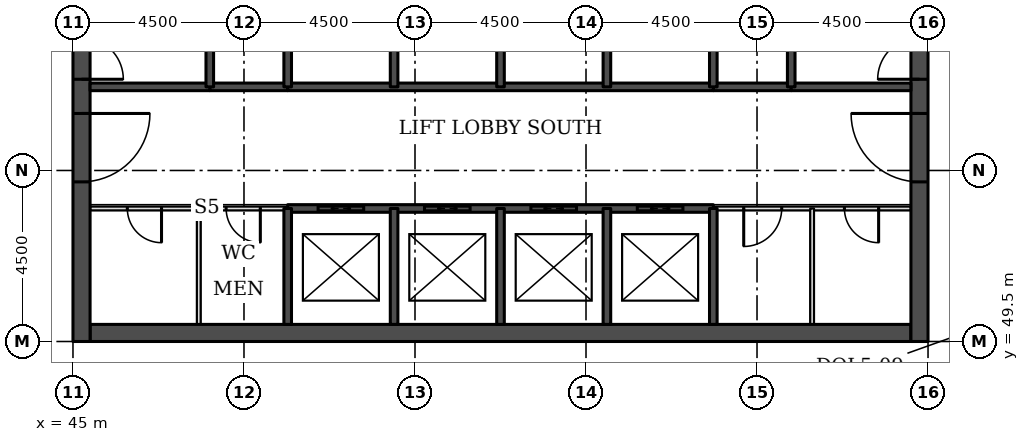
"""IFC4 building model, lengths in metres.
Left out: names, types, materials, properties, quantities, classifications, styles, units other than length and angle.
Written with IfcOpenShell. Run it as: python <this file> out.ifc"""

import sys

from ifc_helpers import new_model, si_unit, direction, frame, frame_2d, origin, place, context, subcontext, project, spatial, rectangle, extrude, element, fill, save


model = new_model("IFC4")
c1 = context("Model", 3, precision=1e-05, world=origin(), true_north=direction((0.0, 1.0)))
c2 = subcontext(c1, "Body", "Model", "MODEL_VIEW")
j1 = project(units=[si_unit("LENGTHUNIT", "METRE"), si_unit("PLANEANGLEUNIT", "RADIAN")], contexts=[c1])
p1 = place(None, origin())
s1 = spatial("IfcSite", under=j1, at=p1, CompositionType="ELEMENT")
p2 = place(p1, origin())
s2 = spatial("IfcBuilding", under=s1, at=p2, CompositionType="ELEMENT")
p3 = place(p2, frame((0.0, 0.0, 108.5)))
s3 = spatial("IfcBuildingStorey", under=s2, at=p3, CompositionType="ELEMENT", Elevation=108.5)
p4 = place(p3, frame((45.45, 49.725, 0.0), z_axis=(0.0, 0.0, 1.0), x_axis=(1.0, 0.0, 0.0)))
e1 = element("IfcWall", 1, at=p4, inside=s3, PredefinedType="SHEAR", context=c2, shape_type="SweptSolid", body=[
    extrude(rectangle(XDim=21.6, YDim=0.45, at=frame_2d((10.8, 0.0))), origin(), (0.0, 0.0, 1.0), 3.7),
])
p5 = place(p3, frame((45.225, 49.5, 0.0), z_axis=(0.0, 0.0, 1.0), x_axis=(0.0, 1.0, 0.0)))
e2 = element("IfcWall", 2, at=p5, inside=s3, PredefinedType="SHEAR", context=c2, shape_type="SweptSolid", body=[
    extrude(rectangle(XDim=22.5, YDim=0.45, at=frame_2d((11.25, 0.0))), origin(), (0.0, 0.0, 1.0), 3.7),
])
p6 = place(p5, frame((4.2, 0.0, 0.0)))
e3 = element("IfcOpeningElement", 3, at=p6, cuts=e2, PredefinedType="OPENING", context=c2, shape_type="SweptSolid", body=[
    extrude(rectangle(XDim=1.8, YDim=2.1, at=frame_2d((0.9, 1.05))), frame((0.0, 0.235, 0.0), z_axis=(0.0, -1.0, 0.0), x_axis=(1.0, 0.0, 0.0)), (0.0, 0.0, 1.0), 0.47),
])
p7 = place(p5, frame((6.9, 0.0, 0.0)))
e4 = element("IfcOpeningElement", 4, at=p7, cuts=e2, PredefinedType="OPENING", context=c2, shape_type="SweptSolid", body=[
    extrude(rectangle(XDim=1.1, YDim=2.1, at=frame_2d((0.55, 1.05))), frame((0.0, 0.235, 0.0), z_axis=(0.0, -1.0, 0.0), x_axis=(1.0, 0.0, 0.0)), (0.0, 0.0, 1.0), 0.47),
])
p8 = place(p5, frame((13.6, 0.0, 0.0)))
e5 = element("IfcOpeningElement", 5, at=p8, cuts=e2, PredefinedType="OPENING", context=c2, shape_type="SweptSolid", body=[
    extrude(rectangle(XDim=1.1, YDim=2.1, at=frame_2d((0.55, 1.05))), frame((0.0, 0.235, 0.0), z_axis=(0.0, -1.0, 0.0), x_axis=(1.0, 0.0, 0.0)), (0.0, 0.0, 1.0), 0.47),
])
p9 = place(p5, frame((16.5, 0.0, 0.0)))
e6 = element("IfcOpeningElement", 6, at=p9, cuts=e2, PredefinedType="OPENING", context=c2, shape_type="SweptSolid", body=[
    extrude(rectangle(XDim=1.8, YDim=2.1, at=frame_2d((0.9, 1.05))), frame((0.0, 0.235, 0.0), z_axis=(0.0, -1.0, 0.0), x_axis=(1.0, 0.0, 0.0)), (0.0, 0.0, 1.0), 0.47),
])
p10 = place(p3, frame((67.275, 49.5, 0.0), z_axis=(0.0, 0.0, 1.0), x_axis=(0.0, 1.0, 0.0)))
e7 = element("IfcWall", 7, at=p10, inside=s3, PredefinedType="SHEAR", context=c2, shape_type="SweptSolid", body=[
    extrude(rectangle(XDim=22.5, YDim=0.45, at=frame_2d((11.25, 0.0))), origin(), (0.0, 0.0, 1.0), 3.7),
])
p11 = place(p10, frame((4.2, 0.0, 0.0)))
e8 = element("IfcOpeningElement", 8, at=p11, cuts=e7, PredefinedType="OPENING", context=c2, shape_type="SweptSolid", body=[
    extrude(rectangle(XDim=1.8, YDim=2.1, at=frame_2d((0.9, 1.05))), frame((0.0, 0.235, 0.0), z_axis=(0.0, -1.0, 0.0), x_axis=(1.0, 0.0, 0.0)), (0.0, 0.0, 1.0), 0.47),
])
p12 = place(p10, frame((6.9, 0.0, 0.0)))
e9 = element("IfcOpeningElement", 9, at=p12, cuts=e7, PredefinedType="OPENING", context=c2, shape_type="SweptSolid", body=[
    extrude(rectangle(XDim=1.1, YDim=2.1, at=frame_2d((0.55, 1.05))), frame((0.0, 0.235, 0.0), z_axis=(0.0, -1.0, 0.0), x_axis=(1.0, 0.0, 0.0)), (0.0, 0.0, 1.0), 0.47),
])
p13 = place(p10, frame((13.6, 0.0, 0.0)))
e10 = element("IfcOpeningElement", 10, at=p13, cuts=e7, PredefinedType="OPENING", context=c2, shape_type="SweptSolid", body=[
    extrude(rectangle(XDim=1.1, YDim=2.1, at=frame_2d((0.55, 1.05))), frame((0.0, 0.235, 0.0), z_axis=(0.0, -1.0, 0.0), x_axis=(1.0, 0.0, 0.0)), (0.0, 0.0, 1.0), 0.47),
])
p14 = place(p10, frame((16.5, 0.0, 0.0)))
e11 = element("IfcOpeningElement", 11, at=p14, cuts=e7, PredefinedType="OPENING", context=c2, shape_type="SweptSolid", body=[
    extrude(rectangle(XDim=1.8, YDim=2.1, at=frame_2d((0.9, 1.05))), frame((0.0, 0.235, 0.0), z_axis=(0.0, -1.0, 0.0), x_axis=(1.0, 0.0, 0.0)), (0.0, 0.0, 1.0), 0.47),
])
p15 = place(p3, frame((45.45, 53.0, 0.0), z_axis=(0.0, 0.0, 1.0), x_axis=(1.0, 0.0, 0.0)))
e12 = element("IfcWall", 12, at=p15, inside=s3, PredefinedType="PARTITIONING", context=c2, shape_type="SweptSolid", body=[
    extrude(rectangle(XDim=5.2, YDim=0.1, at=frame_2d((2.6, 0.0))), origin(), (0.0, 0.0, 1.0), 3.55),
])
p16 = place(p15, frame((0.98, 0.0, 0.0)))
e13 = element("IfcOpeningElement", 13, at=p16, cuts=e12, PredefinedType="OPENING", context=c2, shape_type="SweptSolid", body=[
    extrude(rectangle(XDim=0.9, YDim=2.1, at=frame_2d((0.45, 1.05))), frame((0.0, 0.06, 0.0), z_axis=(0.0, -1.0, 0.0), x_axis=(1.0, 0.0, 0.0)), (0.0, 0.0, 1.0), 0.12),
])
p17 = place(p15, frame((3.58, 0.0, 0.0)))
e14 = element("IfcOpeningElement", 14, at=p17, cuts=e12, PredefinedType="OPENING", context=c2, shape_type="SweptSolid", body=[
    extrude(rectangle(XDim=0.9, YDim=2.1, at=frame_2d((0.45, 1.05))), frame((0.0, 0.06, 0.0), z_axis=(0.0, -1.0, 0.0), x_axis=(1.0, 0.0, 0.0)), (0.0, 0.0, 1.0), 0.12),
])
p18 = place(p3, frame((61.85, 53.0, 0.0), z_axis=(0.0, 0.0, 1.0), x_axis=(1.0, 0.0, 0.0)))
e15 = element("IfcWall", 15, at=p18, inside=s3, PredefinedType="PARTITIONING", context=c2, shape_type="SweptSolid", body=[
    extrude(rectangle(XDim=5.2, YDim=0.1, at=frame_2d((2.6, 0.0))), origin(), (0.0, 0.0, 1.0), 3.55),
])
p19 = place(p18, frame((3.45, 0.0, 0.0)))
e16 = element("IfcOpeningElement", 16, at=p19, cuts=e15, PredefinedType="OPENING", context=c2, shape_type="SweptSolid", body=[
    extrude(rectangle(XDim=0.9, YDim=2.1, at=frame_2d((0.45, 1.05))), frame((0.0, 0.06, 0.0), z_axis=(0.0, -1.0, 0.0), x_axis=(1.0, 0.0, 0.0)), (0.0, 0.0, 1.0), 0.12),
])
p20 = place(p18, frame((0.8, 0.0, 0.0)))
e17 = element("IfcOpeningElement", 17, at=p20, cuts=e15, PredefinedType="OPENING", context=c2, shape_type="SweptSolid", body=[
    extrude(rectangle(XDim=1.0, YDim=2.1, at=frame_2d((0.5, 1.05))), frame((0.0, 0.06, 0.0), z_axis=(0.0, -1.0, 0.0), x_axis=(1.0, 0.0, 0.0)), (0.0, 0.0, 1.0), 0.12),
])
p21 = place(p3, frame((50.65, 53.0, 0.0), z_axis=(0.0, 0.0, 1.0), x_axis=(1.0, 0.0, 0.0)))
e18 = element("IfcWall", 18, at=p21, inside=s3, PredefinedType="SOLIDWALL", context=c2, shape_type="SweptSolid", body=[
    extrude(rectangle(XDim=11.2, YDim=0.2, at=frame_2d((5.6, 0.0))), origin(), (0.0, 0.0, 1.0), 3.55),
])
p22 = place(p21, frame((0.8, 0.0, 0.0)))
e19 = element("IfcOpeningElement", 19, at=p22, cuts=e18, PredefinedType="OPENING", context=c2, shape_type="SweptSolid", body=[
    extrude(rectangle(XDim=1.2, YDim=2.1, at=frame_2d((0.6, 1.05))), frame((0.0, 0.11, 0.0), z_axis=(0.0, -1.0, 0.0), x_axis=(1.0, 0.0, 0.0)), (0.0, 0.0, 1.0), 0.22),
])
p23 = place(p21, frame((3.6, 0.0, 0.0)))
e20 = element("IfcOpeningElement", 20, at=p23, cuts=e18, PredefinedType="OPENING", context=c2, shape_type="SweptSolid", body=[
    extrude(rectangle(XDim=1.2, YDim=2.1, at=frame_2d((0.6, 1.05))), frame((0.0, 0.11, 0.0), z_axis=(0.0, -1.0, 0.0), x_axis=(1.0, 0.0, 0.0)), (0.0, 0.0, 1.0), 0.22),
])
p24 = place(p21, frame((6.4, 0.0, 0.0)))
e21 = element("IfcOpeningElement", 21, at=p24, cuts=e18, PredefinedType="OPENING", context=c2, shape_type="SweptSolid", body=[
    extrude(rectangle(XDim=1.2, YDim=2.1, at=frame_2d((0.6, 1.05))), frame((0.0, 0.11, 0.0), z_axis=(0.0, -1.0, 0.0), x_axis=(1.0, 0.0, 0.0)), (0.0, 0.0, 1.0), 0.22),
])
p25 = place(p21, frame((9.2, 0.0, 0.0)))
e22 = element("IfcOpeningElement", 22, at=p25, cuts=e18, PredefinedType="OPENING", context=c2, shape_type="SweptSolid", body=[
    extrude(rectangle(XDim=1.2, YDim=2.1, at=frame_2d((0.6, 1.05))), frame((0.0, 0.11, 0.0), z_axis=(0.0, -1.0, 0.0), x_axis=(1.0, 0.0, 0.0)), (0.0, 0.0, 1.0), 0.22),
])
for number, where, z_axis, x_axis in (
    (23, (48.6, 56.2, 0.0), (0.0, 0.0, 1.0), (1.0, 0.0, 0.0)),
    (24, (61.85, 56.2, 0.0), (0.0, 0.0, 1.0), (1.0, 0.0, 0.0)),
):
    element("IfcWall", number, at=place(p3, frame(where, z_axis=z_axis, x_axis=x_axis)), inside=s3, PredefinedType="SOLIDWALL", context=c2, shape_type="SweptSolid", body=[
        extrude(rectangle(XDim=2.05, YDim=0.2, at=frame_2d((1.025, 0.0))), origin(), (0.0, 0.0, 1.0), 3.55),
    ])
p26 = place(p3, frame((45.45, 56.2, 0.0), z_axis=(0.0, 0.0, 1.0), x_axis=(1.0, 0.0, 0.0)))
e25 = element("IfcWall", 25, at=p26, inside=s3, PredefinedType="SOLIDWALL", context=c2, shape_type="SweptSolid", body=[
    extrude(rectangle(XDim=3.15, YDim=0.2, at=frame_2d((1.575, 0.0))), origin(), (0.0, 0.0, 1.0), 3.55),
])
p27 = place(p3, frame((50.65, 56.2, 0.0), z_axis=(0.0, 0.0, 1.0), x_axis=(1.0, 0.0, 0.0)))
e26 = element("IfcWall", 26, at=p27, inside=s3, PredefinedType="SOLIDWALL", context=c2, shape_type="SweptSolid", body=[
    extrude(rectangle(XDim=11.2, YDim=0.2, at=frame_2d((5.6, 0.0))), origin(), (0.0, 0.0, 1.0), 3.55),
])
p28 = place(p3, frame((63.9, 56.2, 0.0), z_axis=(0.0, 0.0, 1.0), x_axis=(1.0, 0.0, 0.0)))
e27 = element("IfcWall", 27, at=p28, inside=s3, PredefinedType="SOLIDWALL", context=c2, shape_type="SweptSolid", body=[
    extrude(rectangle(XDim=3.15, YDim=0.2, at=frame_2d((1.575, 0.0))), origin(), (0.0, 0.0, 1.0), 3.55),
])
p29 = place(p3, frame((48.31, 49.95, 0.0), z_axis=(0.0, 0.0, 1.0), x_axis=(0.0, 1.0, 0.0)))
e28 = element("IfcWall", 28, at=p29, inside=s3, PredefinedType="PARTITIONING", context=c2, shape_type="SweptSolid", body=[
    extrude(rectangle(XDim=3.05, YDim=0.1, at=frame_2d((1.525, 0.0))), origin(), (0.0, 0.0, 1.0), 3.55),
])
p30 = place(p3, frame((48.6, 56.2, 0.0), z_axis=(0.0, 0.0, 1.0), x_axis=(0.0, 1.0, 0.0)))
e29 = element("IfcWall", 29, at=p30, inside=s3, PredefinedType="SOLIDWALL", context=c2, shape_type="SweptSolid", body=[
    extrude(rectangle(XDim=5.8, YDim=0.2, at=frame_2d((2.9, 0.0))), origin(), (0.0, 0.0, 1.0), 3.55),
])
p31 = place(p3, frame((50.65, 49.95, 0.0), z_axis=(0.0, 0.0, 1.0), x_axis=(0.0, 1.0, 0.0)))
e30 = element("IfcWall", 30, at=p31, inside=s3, PredefinedType="SOLIDWALL", context=c2, shape_type="SweptSolid", body=[
    extrude(rectangle(XDim=3.05, YDim=0.2, at=frame_2d((1.525, 0.0))), origin(), (0.0, 0.0, 1.0), 3.55),
])
p32 = place(p3, frame((50.65, 56.2, 0.0), z_axis=(0.0, 0.0, 1.0), x_axis=(0.0, 1.0, 0.0)))
e31 = element("IfcWall", 31, at=p32, inside=s3, PredefinedType="SOLIDWALL", context=c2, shape_type="SweptSolid", body=[
    extrude(rectangle(XDim=2.8, YDim=0.2, at=frame_2d((1.4, 0.0))), origin(), (0.0, 0.0, 1.0), 3.55),
])
p33 = place(p3, frame((53.45, 49.95, 0.0), z_axis=(0.0, 0.0, 1.0), x_axis=(0.0, 1.0, 0.0)))
e32 = element("IfcWall", 32, at=p33, inside=s3, PredefinedType="SOLIDWALL", context=c2, shape_type="SweptSolid", body=[
    extrude(rectangle(XDim=3.05, YDim=0.2, at=frame_2d((1.525, 0.0))), origin(), (0.0, 0.0, 1.0), 3.55),
])
p34 = place(p3, frame((53.45, 56.2, 0.0), z_axis=(0.0, 0.0, 1.0), x_axis=(0.0, 1.0, 0.0)))
e33 = element("IfcWall", 33, at=p34, inside=s3, PredefinedType="SOLIDWALL", context=c2, shape_type="SweptSolid", body=[
    extrude(rectangle(XDim=2.8, YDim=0.2, at=frame_2d((1.4, 0.0))), origin(), (0.0, 0.0, 1.0), 3.55),
])
p35 = place(p3, frame((56.25, 49.95, 0.0), z_axis=(0.0, 0.0, 1.0), x_axis=(0.0, 1.0, 0.0)))
e34 = element("IfcWall", 34, at=p35, inside=s3, PredefinedType="SOLIDWALL", context=c2, shape_type="SweptSolid", body=[
    extrude(rectangle(XDim=3.05, YDim=0.2, at=frame_2d((1.525, 0.0))), origin(), (0.0, 0.0, 1.0), 3.55),
])
p36 = place(p3, frame((56.25, 56.2, 0.0), z_axis=(0.0, 0.0, 1.0), x_axis=(0.0, 1.0, 0.0)))
e35 = element("IfcWall", 35, at=p36, inside=s3, PredefinedType="SOLIDWALL", context=c2, shape_type="SweptSolid", body=[
    extrude(rectangle(XDim=2.8, YDim=0.2, at=frame_2d((1.4, 0.0))), origin(), (0.0, 0.0, 1.0), 3.55),
])
p37 = place(p3, frame((59.05, 49.95, 0.0), z_axis=(0.0, 0.0, 1.0), x_axis=(0.0, 1.0, 0.0)))
e36 = element("IfcWall", 36, at=p37, inside=s3, PredefinedType="SOLIDWALL", context=c2, shape_type="SweptSolid", body=[
    extrude(rectangle(XDim=3.05, YDim=0.2, at=frame_2d((1.525, 0.0))), origin(), (0.0, 0.0, 1.0), 3.55),
])
p38 = place(p3, frame((59.05, 56.2, 0.0), z_axis=(0.0, 0.0, 1.0), x_axis=(0.0, 1.0, 0.0)))
e37 = element("IfcWall", 37, at=p38, inside=s3, PredefinedType="SOLIDWALL", context=c2, shape_type="SweptSolid", body=[
    extrude(rectangle(XDim=2.8, YDim=0.2, at=frame_2d((1.4, 0.0))), origin(), (0.0, 0.0, 1.0), 3.55),
])
p39 = place(p3, frame((61.85, 49.95, 0.0), z_axis=(0.0, 0.0, 1.0), x_axis=(0.0, 1.0, 0.0)))
e38 = element("IfcWall", 38, at=p39, inside=s3, PredefinedType="SOLIDWALL", context=c2, shape_type="SweptSolid", body=[
    extrude(rectangle(XDim=3.05, YDim=0.2, at=frame_2d((1.525, 0.0))), origin(), (0.0, 0.0, 1.0), 3.55),
])
p40 = place(p3, frame((61.85, 56.2, 0.0), z_axis=(0.0, 0.0, 1.0), x_axis=(0.0, 1.0, 0.0)))
e39 = element("IfcWall", 39, at=p40, inside=s3, PredefinedType="SOLIDWALL", context=c2, shape_type="SweptSolid", body=[
    extrude(rectangle(XDim=2.8, YDim=0.2, at=frame_2d((1.4, 0.0))), origin(), (0.0, 0.0, 1.0), 3.55),
])
p41 = place(p3, frame((63.9, 56.2, 0.0), z_axis=(0.0, 0.0, 1.0), x_axis=(0.0, 1.0, 0.0)))
e40 = element("IfcWall", 40, at=p41, inside=s3, PredefinedType="SOLIDWALL", context=c2, shape_type="SweptSolid", body=[
    extrude(rectangle(XDim=5.8, YDim=0.2, at=frame_2d((2.9, 0.0))), origin(), (0.0, 0.0, 1.0), 3.55),
])
p42 = place(p3, frame((64.45, 49.95, 0.0), z_axis=(0.0, 0.0, 1.0), x_axis=(0.0, 1.0, 0.0)))
e41 = element("IfcWall", 41, at=p42, inside=s3, PredefinedType="PARTITIONING", context=c2, shape_type="SweptSolid", body=[
    extrude(rectangle(XDim=3.05, YDim=0.1, at=frame_2d((1.525, 0.0))), origin(), (0.0, 0.0, 1.0), 3.55),
])
p43 = place(p22, origin())
e42 = element("IfcDoor", 42, at=p43, inside=s3, OperationType="DOUBLE_DOOR_SLIDING", PredefinedType="DOOR", context=c2, shape_type="SweptSolid", body=[
    extrude(rectangle(XDim=1.2, YDim=2.1, at=frame_2d((0.6, 1.05))), frame((0.0, 0.025, 0.0), z_axis=(0.0, -1.0, 0.0), x_axis=(1.0, 0.0, 0.0)), (0.0, 0.0, 1.0), 0.05),
])
fill(e19, e42)
p44 = place(p23, origin())
e43 = element("IfcDoor", 43, at=p44, inside=s3, OperationType="DOUBLE_DOOR_SLIDING", PredefinedType="DOOR", context=c2, shape_type="SweptSolid", body=[
    extrude(rectangle(XDim=1.2, YDim=2.1, at=frame_2d((0.6, 1.05))), frame((0.0, 0.025, 0.0), z_axis=(0.0, -1.0, 0.0), x_axis=(1.0, 0.0, 0.0)), (0.0, 0.0, 1.0), 0.05),
])
fill(e20, e43)
p45 = place(p24, origin())
e44 = element("IfcDoor", 44, at=p45, inside=s3, OperationType="DOUBLE_DOOR_SLIDING", PredefinedType="DOOR", context=c2, shape_type="SweptSolid", body=[
    extrude(rectangle(XDim=1.2, YDim=2.1, at=frame_2d((0.6, 1.05))), frame((0.0, 0.025, 0.0), z_axis=(0.0, -1.0, 0.0), x_axis=(1.0, 0.0, 0.0)), (0.0, 0.0, 1.0), 0.05),
])
fill(e21, e44)
p46 = place(p25, origin())
e45 = element("IfcDoor", 45, at=p46, inside=s3, OperationType="DOUBLE_DOOR_SLIDING", PredefinedType="DOOR", context=c2, shape_type="SweptSolid", body=[
    extrude(rectangle(XDim=1.2, YDim=2.1, at=frame_2d((0.6, 1.05))), frame((0.0, 0.025, 0.0), z_axis=(0.0, -1.0, 0.0), x_axis=(1.0, 0.0, 0.0)), (0.0, 0.0, 1.0), 0.05),
])
fill(e22, e45)
p47 = place(p6, frame((1.8, 0.0, 0.0), z_axis=(0.0, 0.0, 1.0), x_axis=(-1.0, 0.0, 0.0)))
e46 = element("IfcDoor", 46, at=p47, inside=s3, OperationType="SINGLE_SWING_LEFT", PredefinedType="DOOR", context=c2, shape_type="SweptSolid", body=[
    extrude(rectangle(XDim=1.8, YDim=2.1, at=frame_2d((0.9, 1.05))), frame((0.0, 0.025, 0.0), z_axis=(0.0, -1.0, 0.0), x_axis=(1.0, 0.0, 0.0)), (0.0, 0.0, 1.0), 0.05),
])
fill(e3, e46)
p48 = place(p7, frame((1.1, 0.0, 0.0), z_axis=(0.0, 0.0, 1.0), x_axis=(-1.0, 0.0, 0.0)))
e47 = element("IfcDoor", 47, at=p48, inside=s3, OperationType="SINGLE_SWING_RIGHT", PredefinedType="DOOR", context=c2, shape_type="SweptSolid", body=[
    extrude(rectangle(XDim=1.1, YDim=2.1, at=frame_2d((0.55, 1.05))), frame((0.0, 0.025, 0.0), z_axis=(0.0, -1.0, 0.0), x_axis=(1.0, 0.0, 0.0)), (0.0, 0.0, 1.0), 0.05),
])
fill(e4, e47)
p49 = place(p11, origin())
e48 = element("IfcDoor", 48, at=p49, inside=s3, OperationType="SINGLE_SWING_RIGHT", PredefinedType="DOOR", context=c2, shape_type="SweptSolid", body=[
    extrude(rectangle(XDim=1.8, YDim=2.1, at=frame_2d((0.9, 1.05))), frame((0.0, 0.025, 0.0), z_axis=(0.0, -1.0, 0.0), x_axis=(1.0, 0.0, 0.0)), (0.0, 0.0, 1.0), 0.05),
])
fill(e8, e48)
p50 = place(p12, origin())
e49 = element("IfcDoor", 49, at=p50, inside=s3, OperationType="SINGLE_SWING_LEFT", PredefinedType="DOOR", context=c2, shape_type="SweptSolid", body=[
    extrude(rectangle(XDim=1.1, YDim=2.1, at=frame_2d((0.55, 1.05))), frame((0.0, 0.025, 0.0), z_axis=(0.0, -1.0, 0.0), x_axis=(1.0, 0.0, 0.0)), (0.0, 0.0, 1.0), 0.05),
])
fill(e9, e49)
p51 = place(p19, frame((0.9, 0.0, 0.0), z_axis=(0.0, 0.0, 1.0), x_axis=(-1.0, 0.0, 0.0)))
e50 = element("IfcDoor", 50, at=p51, inside=s3, OperationType="SINGLE_SWING_LEFT", PredefinedType="DOOR", context=c2, shape_type="SweptSolid", body=[
    extrude(rectangle(XDim=0.9, YDim=2.1, at=frame_2d((0.45, 1.05))), frame((0.0, 0.025, 0.0), z_axis=(0.0, -1.0, 0.0), x_axis=(1.0, 0.0, 0.0)), (0.0, 0.0, 1.0), 0.05),
])
fill(e16, e50)
p52 = place(p20, frame((1.0, 0.0, 0.0), z_axis=(0.0, 0.0, 1.0), x_axis=(-1.0, 0.0, 0.0)))
e51 = element("IfcDoor", 51, at=p52, inside=s3, OperationType="SINGLE_SWING_RIGHT", PredefinedType="DOOR", context=c2, shape_type="SweptSolid", body=[
    extrude(rectangle(XDim=1.0, YDim=2.1, at=frame_2d((0.5, 1.05))), frame((0.0, 0.025, 0.0), z_axis=(0.0, -1.0, 0.0), x_axis=(1.0, 0.0, 0.0)), (0.0, 0.0, 1.0), 0.05),
])
fill(e17, e51)
p53 = place(p16, frame((0.9, 0.0, 0.0), z_axis=(0.0, 0.0, 1.0), x_axis=(-1.0, 0.0, 0.0)))
e52 = element("IfcDoor", 52, at=p53, inside=s3, OperationType="SINGLE_SWING_LEFT", PredefinedType="DOOR", context=c2, shape_type="SweptSolid", body=[
    extrude(rectangle(XDim=0.9, YDim=2.1, at=frame_2d((0.45, 1.05))), frame((0.0, 0.025, 0.0), z_axis=(0.0, -1.0, 0.0), x_axis=(1.0, 0.0, 0.0)), (0.0, 0.0, 1.0), 0.05),
])
fill(e13, e52)
p54 = place(p17, frame((0.9, 0.0, 0.0), z_axis=(0.0, 0.0, 1.0), x_axis=(-1.0, 0.0, 0.0)))
e53 = element("IfcDoor", 53, at=p54, inside=s3, OperationType="SINGLE_SWING_LEFT", PredefinedType="DOOR", context=c2, shape_type="SweptSolid", body=[
    extrude(rectangle(XDim=0.9, YDim=2.1, at=frame_2d((0.45, 1.05))), frame((0.0, 0.025, 0.0), z_axis=(0.0, -1.0, 0.0), x_axis=(1.0, 0.0, 0.0)), (0.0, 0.0, 1.0), 0.05),
])
fill(e14, e53)
save(model, sys.argv[1])
